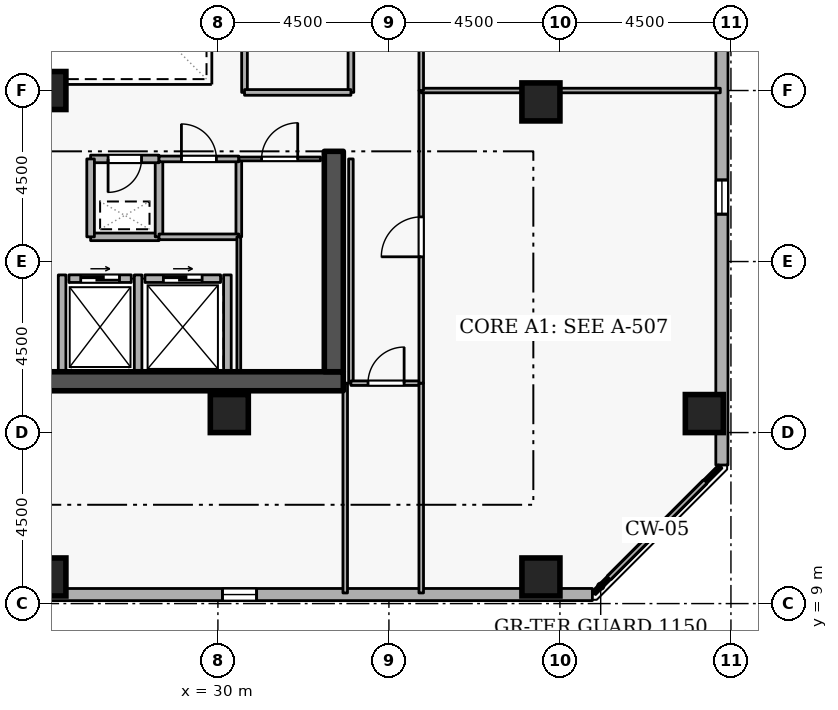
"""IFC4 building model, lengths in metres.
Left out: names, types, materials, properties, quantities, classifications, styles, units other than length and angle.
Written with IfcOpenShell. Run it as: python <this file> out.ifc"""

import sys

from ifc_helpers import new_model, si_unit, direction, frame, frame_2d, origin, origin_2d, place, context, subcontext, project, spatial, rectangle, extrude, element, fill, save


model = new_model("IFC4")
c1 = context("Model", 3, precision=1e-05, world=origin(), true_north=direction((0.0, 1.0)))
c2 = subcontext(c1, "Body", "Model", "MODEL_VIEW")
j1 = project(units=[si_unit("LENGTHUNIT", "METRE"), si_unit("PLANEANGLEUNIT", "RADIAN")], contexts=[c1])
p1 = place(None, origin())
s1 = spatial("IfcSite", under=j1, at=p1, CompositionType="ELEMENT")
p2 = place(p1, origin())
s2 = spatial("IfcBuilding", under=s1, at=p2, CompositionType="ELEMENT")
p3 = place(p2, frame((0.0, 0.0, 210.9)))
s3 = spatial("IfcBuildingStorey", under=s2, at=p3, CompositionType="ELEMENT", Elevation=210.9)
p4 = place(p3, frame((17.7, 14.85, 0.0), z_axis=(0.0, 0.0, 1.0), x_axis=(1.0, 0.0, 0.0)))
e1 = element("IfcWall", 1, at=p4, inside=s3, PredefinedType="SHEAR", context=c2, shape_type="SweptSolid", body=[
    extrude(rectangle(XDim=15.6, YDim=0.5, at=frame_2d((7.8, 0.0))), origin(), (0.0, 0.0, 1.0), 3.6),
])
p5 = place(p3, frame((33.05, 15.1, 0.0), z_axis=(0.0, 0.0, 1.0), x_axis=(0.0, 1.0, 0.0)))
e2 = element("IfcWall", 2, at=p5, inside=s3, PredefinedType="SHEAR", context=c2, shape_type="SweptSolid", body=[
    extrude(rectangle(XDim=5.8, YDim=0.5, at=frame_2d((2.9, 0.0))), origin(), (0.0, 0.0, 1.0), 3.6),
])
for number, where, z_axis, x_axis in (
    (3, (25.5, 9.7, 0.0), (0.0, 0.0, 1.0), (1.0, 0.0, 0.0)),
    (4, (38.5, 9.7, 0.0), (0.0, 0.0, 1.0), (1.0, 0.0, 0.0)),
    (5, (42.8, 14.0, 0.0), (0.0, 0.0, 1.0), (1.0, 0.0, 0.0)),
    (6, (38.5, 22.2, 0.0), (0.0, 0.0, 1.0), (1.0, 0.0, 0.0)),
    (7, (30.3, 14.0, 0.0), (0.0, 0.0, 1.0), (1.0, 0.0, 0.0)),
    (8, (25.5, 22.5, 0.0), (0.0, 0.0, 1.0), (1.0, 0.0, 0.0)),
):
    element("IfcColumn", number, at=place(p3, frame(where, z_axis=z_axis, x_axis=x_axis)), inside=s3, PredefinedType="COLUMN", context=c2, shape_type="SweptSolid", body=[
        extrude(rectangle(XDim=1.0, YDim=1.0, at=origin_2d()), origin(), (0.0, 0.0, 1.0), 3.6),
    ])
p6 = place(p3, frame((4.319, 9.235, 0.0), z_axis=(0.0, 0.0, 1.0), x_axis=(0.999999997144, 7.5574884e-05, 0.0)))
e9 = element("IfcWall", 9, at=p6, inside=s3, PredefinedType="STANDARD", context=c2, shape_type="SweptSolid", body=[
    extrude(rectangle(XDim=35.535, YDim=0.32, at=frame_2d((17.768, 0.0))), origin(), (0.0, 0.0, 1.0), 2.7),
])
p7 = place(p6, frame((1.8, 0.0, 0.72)))
e10 = element("IfcOpeningElement", 10, at=p7, cuts=e9, PredefinedType="OPENING", context=c2, shape_type="SweptSolid", body=[
    extrude(rectangle(XDim=0.9, YDim=1.75, at=frame_2d((0.45, 0.875))), frame((0.0, 0.17, 0.0), z_axis=(0.0, -1.0, 0.0), x_axis=(1.0, 0.0, 0.0)), (0.0, 0.0, 1.0), 0.34),
])
p8 = place(p6, frame((11.4, 0.0, 0.72)))
e11 = element("IfcOpeningElement", 11, at=p8, cuts=e9, PredefinedType="OPENING", context=c2, shape_type="SweptSolid", body=[
    extrude(rectangle(XDim=0.9, YDim=1.75, at=frame_2d((0.45, 0.875))), frame((0.0, 0.17, 0.0), z_axis=(0.0, -1.0, 0.0), x_axis=(1.0, 0.0, 0.0)), (0.0, 0.0, 1.0), 0.34),
])
p9 = place(p6, frame((16.2, 0.0, 0.72)))
e12 = element("IfcOpeningElement", 12, at=p9, cuts=e9, PredefinedType="OPENING", context=c2, shape_type="SweptSolid", body=[
    extrude(rectangle(XDim=0.9, YDim=1.75, at=frame_2d((0.45, 0.875))), frame((0.0, 0.17, 0.0), z_axis=(0.0, -1.0, 0.0), x_axis=(1.0, 0.0, 0.0)), (0.0, 0.0, 1.0), 0.34),
])
p10 = place(p6, frame((25.8, 0.0, 0.72)))
e13 = element("IfcOpeningElement", 13, at=p10, cuts=e9, PredefinedType="OPENING", context=c2, shape_type="SweptSolid", body=[
    extrude(rectangle(XDim=0.9, YDim=1.75, at=frame_2d((0.45, 0.875))), frame((0.0, 0.17, 0.0), z_axis=(0.0, -1.0, 0.0), x_axis=(1.0, 0.0, 0.0)), (0.0, 0.0, 1.0), 0.34),
])
p11 = place(p3, frame((43.262, 12.646, 0.0), z_axis=(0.0, 0.0, 1.0), x_axis=(7.5574884e-05, 0.999999997144, 0.0)))
e14 = element("IfcWall", 14, at=p11, inside=s3, PredefinedType="STANDARD", context=c2, shape_type="SweptSolid", body=[
    extrude(rectangle(XDim=35.535, YDim=0.32, at=frame_2d((17.768, 0.0))), origin(), (0.0, 0.0, 1.0), 2.7),
])
p12 = place(p11, frame((6.6, 0.0, 0.72)))
e15 = element("IfcOpeningElement", 15, at=p12, cuts=e14, PredefinedType="OPENING", context=c2, shape_type="SweptSolid", body=[
    extrude(rectangle(XDim=0.9, YDim=1.75, at=frame_2d((0.45, 0.875))), frame((0.0, 0.17, 0.0), z_axis=(0.0, -1.0, 0.0), x_axis=(1.0, 0.0, 0.0)), (0.0, 0.0, 1.0), 0.34),
])
p13 = place(p11, frame((11.4, 0.0, 0.72)))
e16 = element("IfcOpeningElement", 16, at=p13, cuts=e14, PredefinedType="OPENING", context=c2, shape_type="SweptSolid", body=[
    extrude(rectangle(XDim=0.9, YDim=1.75, at=frame_2d((0.45, 0.875))), frame((0.0, 0.17, 0.0), z_axis=(0.0, -1.0, 0.0), x_axis=(1.0, 0.0, 0.0)), (0.0, 0.0, 1.0), 0.34),
])
p14 = place(p11, frame((21.0, 0.0, 0.72)))
e17 = element("IfcOpeningElement", 17, at=p14, cuts=e14, PredefinedType="OPENING", context=c2, shape_type="SweptSolid", body=[
    extrude(rectangle(XDim=0.9, YDim=1.75, at=frame_2d((0.45, 0.875))), frame((0.0, 0.17, 0.0), z_axis=(0.0, -1.0, 0.0), x_axis=(1.0, 0.0, 0.0)), (0.0, 0.0, 1.0), 0.34),
])
p15 = place(p11, frame((30.6, 0.0, 0.72)))
e18 = element("IfcOpeningElement", 18, at=p15, cuts=e14, PredefinedType="OPENING", context=c2, shape_type="SweptSolid", body=[
    extrude(rectangle(XDim=0.9, YDim=1.75, at=frame_2d((0.45, 0.875))), frame((0.0, 0.17, 0.0), z_axis=(0.0, -1.0, 0.0), x_axis=(1.0, 0.0, 0.0)), (0.0, 0.0, 1.0), 0.34),
])
p16 = place(p3, frame((26.08, 17.55, 0.0), z_axis=(0.0, 0.0, 1.0), x_axis=(1.0, 0.0, 0.0)))
e19 = element("IfcWall", 19, at=p16, inside=s3, PredefinedType="STANDARD", context=c2, shape_type="SweptSolid", body=[
    extrude(rectangle(XDim=1.64, YDim=0.2, at=frame_2d((0.82, 0.0))), origin(), (0.0, 0.0, 1.0), 3.34),
])
p17 = place(p16, frame((0.31, 0.0, 0.0)))
e20 = element("IfcOpeningElement", 20, at=p17, cuts=e19, PredefinedType="OPENING", context=c2, shape_type="SweptSolid", body=[
    extrude(rectangle(XDim=1.02, YDim=2.06, at=frame_2d((0.51, 1.03))), frame((0.0, 0.11, 0.0), z_axis=(0.0, -1.0, 0.0), x_axis=(1.0, 0.0, 0.0)), (0.0, 0.0, 1.0), 0.22),
])
p18 = place(p3, frame((28.08, 17.55, 0.0), z_axis=(0.0, 0.0, 1.0), x_axis=(1.0, 0.0, 0.0)))
e21 = element("IfcWall", 21, at=p18, inside=s3, PredefinedType="STANDARD", context=c2, shape_type="SweptSolid", body=[
    extrude(rectangle(XDim=1.99, YDim=0.2, at=frame_2d((0.995, 0.0))), origin(), (0.0, 0.0, 1.0), 3.34),
])
p19 = place(p18, frame((0.485, 0.0, 0.0)))
e22 = element("IfcOpeningElement", 22, at=p19, cuts=e21, PredefinedType="OPENING", context=c2, shape_type="SweptSolid", body=[
    extrude(rectangle(XDim=1.02, YDim=2.06, at=frame_2d((0.51, 1.03))), frame((0.0, 0.11, 0.0), z_axis=(0.0, -1.0, 0.0), x_axis=(1.0, 0.0, 0.0)), (0.0, 0.0, 1.0), 0.22),
])
for number, where, z_axis, x_axis in (
    (23, (27.9, 15.112, 0.0), (0.0, 0.0, 1.0), (0.0, 1.0, 0.0)),
    (24, (25.9, 15.112, 0.0), (0.0, 0.0, 1.0), (0.0, 1.0, 0.0)),
    (25, (30.25, 15.112, 0.0), (0.0, 0.0, 1.0), (0.0, 1.0, 0.0)),
):
    element("IfcWall", number, at=place(p3, frame(where, z_axis=z_axis, x_axis=x_axis)), inside=s3, PredefinedType="STANDARD", context=c2, shape_type="SweptSolid", body=[
        extrude(rectangle(XDim=2.536, YDim=0.2, at=frame_2d((1.268, 0.0))), origin(), (0.0, 0.0, 1.0), 3.34),
    ])
p20 = place(p3, frame((26.65, 18.65, 0.0), z_axis=(0.0, 0.0, 1.0), x_axis=(1.0, 0.0, 0.0)))
e26 = element("IfcWall", 26, at=p20, inside=s3, PredefinedType="STANDARD", context=c2, shape_type="SweptSolid", body=[
    extrude(rectangle(XDim=1.8, YDim=0.2, at=frame_2d((0.9, 0.0))), origin(), (0.0, 0.0, 1.0), 3.34),
])
p21 = place(p3, frame((28.45, 18.65, 0.0), z_axis=(0.0, 0.0, 1.0), x_axis=(0.0, 1.0, 0.0)))
e27 = element("IfcWall", 27, at=p21, inside=s3, PredefinedType="STANDARD", context=c2, shape_type="SweptSolid", body=[
    extrude(rectangle(XDim=2.05, YDim=0.2, at=frame_2d((1.025, 0.0))), origin(), (0.0, 0.0, 1.0), 3.34),
])
p22 = place(p3, frame((28.45, 20.7, 0.0), z_axis=(0.0, 0.0, 1.0), x_axis=(-1.0, 0.0, 0.0)))
e28 = element("IfcWall", 28, at=p22, inside=s3, PredefinedType="STANDARD", context=c2, shape_type="SweptSolid", body=[
    extrude(rectangle(XDim=1.8, YDim=0.2, at=frame_2d((0.9, 0.0))), origin(), (0.0, 0.0, 1.0), 3.34),
])
p23 = place(p22, frame((0.46, 0.0, 0.0)))
e29 = element("IfcOpeningElement", 29, at=p23, cuts=e28, PredefinedType="OPENING", context=c2, shape_type="SweptSolid", body=[
    extrude(rectangle(XDim=0.88, YDim=2.04, at=frame_2d((0.44, 1.02))), frame((0.0, 0.11, 0.0), z_axis=(0.0, -1.0, 0.0), x_axis=(1.0, 0.0, 0.0)), (0.0, 0.0, 1.0), 0.22),
])
p24 = place(p3, frame((26.65, 20.7, 0.0), z_axis=(0.0, 0.0, 1.0), x_axis=(0.0, -1.0, 0.0)))
e30 = element("IfcWall", 30, at=p24, inside=s3, PredefinedType="STANDARD", context=c2, shape_type="SweptSolid", body=[
    extrude(rectangle(XDim=2.05, YDim=0.2, at=frame_2d((1.025, 0.0))), origin(), (0.0, 0.0, 1.0), 3.34),
])
p25 = place(p3, frame((30.55, 20.7, 0.0), z_axis=(0.0, 0.0, 1.0), x_axis=(0.0, -1.0, 0.0)))
e31 = element("IfcWall", 31, at=p25, inside=s3, PredefinedType="PARTITIONING", context=c2, shape_type="SweptSolid", body=[
    extrude(rectangle(XDim=2.05, YDim=0.15, at=frame_2d((1.025, 0.0))), origin(), (0.0, 0.0, 1.0), 3.34),
])
p26 = place(p3, frame((30.55, 18.65, 0.0), z_axis=(0.0, 0.0, 1.0), x_axis=(-1.0, 0.0, 0.0)))
e32 = element("IfcWall", 32, at=p26, inside=s3, PredefinedType="PARTITIONING", context=c2, shape_type="SweptSolid", body=[
    extrude(rectangle(XDim=2.1, YDim=0.15, at=frame_2d((1.05, 0.0))), origin(), (0.0, 0.0, 1.0), 3.34),
])
p27 = place(p3, frame((28.45, 20.7, 0.0), z_axis=(0.0, 0.0, 1.0), x_axis=(1.0, 0.0, 0.0)))
e33 = element("IfcWall", 33, at=p27, inside=s3, PredefinedType="PARTITIONING", context=c2, shape_type="SweptSolid", body=[
    extrude(rectangle(XDim=2.1, YDim=0.15, at=frame_2d((1.05, 0.0))), origin(), (0.0, 0.0, 1.0), 3.34),
])
p28 = place(p27, frame((0.59, 0.0, 0.0)))
e34 = element("IfcOpeningElement", 34, at=p28, cuts=e33, PredefinedType="OPENING", context=c2, shape_type="SweptSolid", body=[
    extrude(rectangle(XDim=0.92, YDim=2.08, at=frame_2d((0.46, 1.04))), frame((0.0, 0.085, 0.0), z_axis=(0.0, -1.0, 0.0), x_axis=(1.0, 0.0, 0.0)), (0.0, 0.0, 1.0), 0.17),
])
p29 = place(p3, frame((30.55, 15.1, 0.0), z_axis=(0.0, 0.0, 1.0), x_axis=(0.0, 1.0, 0.0)))
e35 = element("IfcWall", 35, at=p29, inside=s3, PredefinedType="PARTITIONING", context=c2, shape_type="SweptSolid", body=[
    extrude(rectangle(XDim=3.55, YDim=0.1, at=frame_2d((1.775, 0.0))), origin(), (0.0, 0.0, 1.0), 3.34),
])
p30 = place(p3, frame((30.55, 20.7, 0.0), z_axis=(0.0, 0.0, 1.0), x_axis=(1.0, 0.0, 0.0)))
e36 = element("IfcWall", 36, at=p30, inside=s3, PredefinedType="PARTITIONING", context=c2, shape_type="SweptSolid", body=[
    extrude(rectangle(XDim=2.15, YDim=0.1, at=frame_2d((1.075, 0.0))), origin(), (0.0, 0.0, 1.0), 3.34),
])
p31 = place(p30, frame((0.6, 0.0, 0.0)))
e37 = element("IfcOpeningElement", 37, at=p31, cuts=e36, PredefinedType="OPENING", context=c2, shape_type="SweptSolid", body=[
    extrude(rectangle(XDim=0.95, YDim=2.1, at=frame_2d((0.475, 1.05))), frame((0.0, 0.06, 0.0), z_axis=(0.0, -1.0, 0.0), x_axis=(1.0, 0.0, 0.0)), (0.0, 0.0, 1.0), 0.12),
])
p32 = place(p3, frame((33.5, 20.7, 0.0), z_axis=(0.0, 0.0, 1.0), x_axis=(0.0, -1.0, 0.0)))
e38 = element("IfcWall", 38, at=p32, inside=s3, PredefinedType="PARTITIONING", context=c2, shape_type="SweptSolid", body=[
    extrude(rectangle(XDim=5.9, YDim=0.12, at=frame_2d((2.95, 0.0))), origin(), (0.0, 0.0, 1.0), 3.34),
])
p33 = place(p3, frame((33.5, 14.8, 0.0), z_axis=(0.0, 0.0, 1.0), x_axis=(1.0, 0.0, 0.0)))
e39 = element("IfcWall", 39, at=p33, inside=s3, PredefinedType="PARTITIONING", context=c2, shape_type="SweptSolid", body=[
    extrude(rectangle(XDim=1.85, YDim=0.12, at=frame_2d((0.925, 0.0))), origin(), (0.0, 0.0, 1.0), 3.34),
])
p34 = place(p33, frame((0.45, 0.0, 0.0)))
e40 = element("IfcOpeningElement", 40, at=p34, cuts=e39, PredefinedType="OPENING", context=c2, shape_type="SweptSolid", body=[
    extrude(rectangle(XDim=0.95, YDim=2.1, at=frame_2d((0.475, 1.05))), frame((0.0, 0.07, 0.0), z_axis=(0.0, -1.0, 0.0), x_axis=(1.0, 0.0, 0.0)), (0.0, 0.0, 1.0), 0.14),
])
for number, where, z_axis, x_axis in (
    (41, (35.35, 14.8, 0.0), (0.0, 0.0, 1.0), (0.0, -1.0, 0.0)),
    (42, (33.35, 9.28, 0.0), (0.0, 0.0, 1.0), (0.0, 1.0, 0.0)),
):
    element("IfcWall", number, at=place(p3, frame(where, z_axis=z_axis, x_axis=x_axis)), inside=s3, PredefinedType="PARTITIONING", context=c2, shape_type="SweptSolid", body=[
        extrude(rectangle(XDim=5.52, YDim=0.12, at=frame_2d((2.76, 0.0))), origin(), (0.0, 0.0, 1.0), 3.34),
    ])
p35 = place(p3, frame((35.35, 14.8, 0.0), z_axis=(0.0, 0.0, 1.0), x_axis=(0.0, 1.0, 0.0)))
e43 = element("IfcWall", 43, at=p35, inside=s3, PredefinedType="PARTITIONING", context=c2, shape_type="SweptSolid", body=[
    extrude(rectangle(XDim=7.7, YDim=0.12, at=frame_2d((3.85, 0.0))), origin(), (0.0, 0.0, 1.0), 3.34),
])
p36 = place(p35, frame((3.325, 0.0, 0.0)))
e44 = element("IfcOpeningElement", 44, at=p36, cuts=e43, PredefinedType="OPENING", context=c2, shape_type="SweptSolid", body=[
    extrude(rectangle(XDim=1.05, YDim=2.1, at=frame_2d((0.525, 1.05))), frame((0.0, 0.07, 0.0), z_axis=(0.0, -1.0, 0.0), x_axis=(1.0, 0.0, 0.0)), (0.0, 0.0, 1.0), 0.14),
])
p37 = place(p3, frame((35.35, 22.5, 0.0), z_axis=(0.0, 0.0, 1.0), x_axis=(1.0, 0.0, 0.0)))
e45 = element("IfcWall", 45, at=p37, inside=s3, PredefinedType="PARTITIONING", context=c2, shape_type="SweptSolid", body=[
    extrude(rectangle(XDim=7.87, YDim=0.12, at=frame_2d((3.935, 0.0))), origin(), (0.0, 0.0, 1.0), 3.34),
])
p38 = place(p3, frame((43.22, 12.606, 0.0), z_axis=(0.0, 0.0, 1.0), x_axis=(-0.707106781187, -0.707106781187, 0.0)))
e46 = element("IfcWall", 46, at=p38, inside=s3, PredefinedType="PARTITIONING", context=c2, shape_type="SweptSolid", body=[
    extrude(rectangle(XDim=4.703, YDim=0.12, at=frame_2d((2.352, 0.0))), origin(), (0.0, 0.0, 1.0), 3.34),
])
p39 = place(p3, frame((35.35, 22.5, 0.0), z_axis=(0.0, 0.0, 1.0), x_axis=(0.0, 1.0, 0.0)))
e47 = element("IfcWall", 47, at=p39, inside=s3, PredefinedType="PARTITIONING", context=c2, shape_type="SweptSolid", body=[
    extrude(rectangle(XDim=6.3, YDim=0.12, at=frame_2d((3.15, 0.0))), origin(), (0.0, 0.0, 1.0), 3.34),
])
p40 = place(p39, frame((2.675, 0.0, 0.0)))
e48 = element("IfcOpeningElement", 48, at=p40, cuts=e47, PredefinedType="OPENING", context=c2, shape_type="SweptSolid", body=[
    extrude(rectangle(XDim=0.95, YDim=2.1, at=frame_2d((0.475, 1.05))), frame((0.0, 0.07, 0.0), z_axis=(0.0, -1.0, 0.0), x_axis=(1.0, 0.0, 0.0)), (0.0, 0.0, 1.0), 0.14),
])
p41 = place(p3, frame((30.7, 22.45, 0.0), z_axis=(0.0, 0.0, 1.0), x_axis=(0.0, 1.0, 0.0)))
e49 = element("IfcWall", 49, at=p41, inside=s3, PredefinedType="PARTITIONING", context=c2, shape_type="SweptSolid", body=[
    extrude(rectangle(XDim=4.55, YDim=0.15, at=frame_2d((2.275, 0.0))), origin(), (0.0, 0.0, 1.0), 3.34),
])
p42 = place(p3, frame((33.5, 27.0, 0.0), z_axis=(0.0, 0.0, 1.0), x_axis=(0.0, -1.0, 0.0)))
e50 = element("IfcWall", 50, at=p42, inside=s3, PredefinedType="PARTITIONING", context=c2, shape_type="SweptSolid", body=[
    extrude(rectangle(XDim=4.55, YDim=0.15, at=frame_2d((2.275, 0.0))), origin(), (0.0, 0.0, 1.0), 3.34),
])
p43 = place(p42, frame((1.625, 0.0, 0.0)))
e51 = element("IfcOpeningElement", 51, at=p43, cuts=e50, PredefinedType="OPENING", context=c2, shape_type="SweptSolid", body=[
    extrude(rectangle(XDim=1.3, YDim=2.12, at=frame_2d((0.65, 1.06))), frame((0.0, 0.085, 0.0), z_axis=(0.0, -1.0, 0.0), x_axis=(1.0, 0.0, 0.0)), (0.0, 0.0, 1.0), 0.17),
])
p44 = place(p3, frame((33.5, 22.45, 0.0), z_axis=(0.0, 0.0, 1.0), x_axis=(-1.0, 0.0, 0.0)))
e52 = element("IfcWall", 52, at=p44, inside=s3, PredefinedType="PARTITIONING", context=c2, shape_type="SweptSolid", body=[
    extrude(rectangle(XDim=2.8, YDim=0.15, at=frame_2d((1.4, 0.0))), origin(), (0.0, 0.0, 1.0), 3.34),
])
p45 = place(p10, origin())
e53 = element("IfcWindow", 53, at=p45, inside=s3, PartitioningType="SINGLE_PANEL", PredefinedType="WINDOW", context=c2, shape_type="SweptSolid", body=[
    extrude(rectangle(XDim=0.9, YDim=1.75, at=frame_2d((0.45, 0.875))), frame((0.0, 0.03, 0.0), z_axis=(0.0, -1.0, 0.0), x_axis=(1.0, 0.0, 0.0)), (0.0, 0.0, 1.0), 0.06),
])
fill(e13, e53)
p46 = place(p12, origin())
e54 = element("IfcWindow", 54, at=p46, inside=s3, PartitioningType="SINGLE_PANEL", PredefinedType="WINDOW", context=c2, shape_type="SweptSolid", body=[
    extrude(rectangle(XDim=0.9, YDim=1.75, at=frame_2d((0.45, 0.875))), frame((0.0, 0.03, 0.0), z_axis=(0.0, -1.0, 0.0), x_axis=(1.0, 0.0, 0.0)), (0.0, 0.0, 1.0), 0.06),
])
fill(e15, e54)
p47 = place(p17, origin())
e55 = element("IfcDoor", 55, at=p47, inside=s3, OperationType="SLIDING_TO_LEFT", PredefinedType="DOOR", context=c2, shape_type="SweptSolid", body=[
    extrude(rectangle(XDim=1.02, YDim=2.06, at=frame_2d((0.51, 1.03))), frame((0.0, 0.025, 0.0), z_axis=(0.0, -1.0, 0.0), x_axis=(1.0, 0.0, 0.0)), (0.0, 0.0, 1.0), 0.05),
])
fill(e20, e55)
p48 = place(p19, origin())
e56 = element("IfcDoor", 56, at=p48, inside=s3, OperationType="SLIDING_TO_LEFT", PredefinedType="DOOR", context=c2, shape_type="SweptSolid", body=[
    extrude(rectangle(XDim=1.02, YDim=2.06, at=frame_2d((0.51, 1.03))), frame((0.0, 0.025, 0.0), z_axis=(0.0, -1.0, 0.0), x_axis=(1.0, 0.0, 0.0)), (0.0, 0.0, 1.0), 0.05),
])
fill(e22, e56)
p49 = place(p23, origin())
e57 = element("IfcDoor", 57, at=p49, inside=s3, OperationType="SINGLE_SWING_RIGHT", PredefinedType="DOOR", context=c2, shape_type="SweptSolid", body=[
    extrude(rectangle(XDim=0.88, YDim=2.04, at=frame_2d((0.44, 1.02))), frame((0.0, 0.025, 0.0), z_axis=(0.0, -1.0, 0.0), x_axis=(1.0, 0.0, 0.0)), (0.0, 0.0, 1.0), 0.05),
])
fill(e29, e57)
p50 = place(p28, origin())
e58 = element("IfcDoor", 58, at=p50, inside=s3, OperationType="SINGLE_SWING_LEFT", PredefinedType="DOOR", context=c2, shape_type="SweptSolid", body=[
    extrude(rectangle(XDim=0.92, YDim=2.08, at=frame_2d((0.46, 1.04))), frame((0.0, 0.025, 0.0), z_axis=(0.0, -1.0, 0.0), x_axis=(1.0, 0.0, 0.0)), (0.0, 0.0, 1.0), 0.05),
])
fill(e34, e58)
p51 = place(p31, origin())
e59 = element("IfcDoor", 59, at=p51, inside=s3, OperationType="SINGLE_SWING_RIGHT", PredefinedType="DOOR", context=c2, shape_type="SweptSolid", body=[
    extrude(rectangle(XDim=0.95, YDim=2.1, at=frame_2d((0.475, 1.05))), frame((0.0, 0.025, 0.0), z_axis=(0.0, -1.0, 0.0), x_axis=(1.0, 0.0, 0.0)), (0.0, 0.0, 1.0), 0.05),
])
fill(e37, e59)
p52 = place(p34, origin())
e60 = element("IfcDoor", 60, at=p52, inside=s3, OperationType="SINGLE_SWING_RIGHT", PredefinedType="DOOR", context=c2, shape_type="SweptSolid", body=[
    extrude(rectangle(XDim=0.95, YDim=2.1, at=frame_2d((0.475, 1.05))), frame((0.0, 0.025, 0.0), z_axis=(0.0, -1.0, 0.0), x_axis=(1.0, 0.0, 0.0)), (0.0, 0.0, 1.0), 0.05),
])
fill(e40, e60)
p53 = place(p36, origin())
e61 = element("IfcDoor", 61, at=p53, inside=s3, OperationType="SINGLE_SWING_LEFT", PredefinedType="DOOR", context=c2, shape_type="SweptSolid", body=[
    extrude(rectangle(XDim=1.05, YDim=2.1, at=frame_2d((0.525, 1.05))), frame((0.0, 0.025, 0.0), z_axis=(0.0, -1.0, 0.0), x_axis=(1.0, 0.0, 0.0)), (0.0, 0.0, 1.0), 0.05),
])
fill(e44, e61)
save(model, sys.argv[1])
